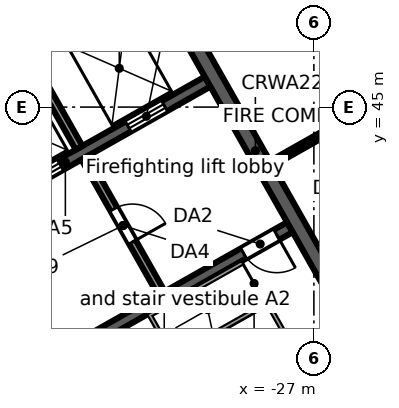
"""IFC4 building model, lengths in metres.
Left out: names, types, materials, properties, quantities, classifications, styles, units other than length and angle.
Written with IfcOpenShell. Run it as: python <this file> out.ifc"""

import sys

from ifc_helpers import new_model, si_unit, direction, frame, frame_2d, origin, place, context, subcontext, project, spatial, rectangle, extrude, element, fill, save


model = new_model("IFC4")
c1 = context("Model", 3, precision=1e-05, world=origin(), true_north=direction((0.0, 1.0)))
c2 = subcontext(c1, "Body", "Model", "MODEL_VIEW")
j1 = project(units=[si_unit("LENGTHUNIT", "METRE"), si_unit("PLANEANGLEUNIT", "RADIAN")], contexts=[c1])
p1 = place(None, origin())
s1 = spatial("IfcSite", under=j1, at=p1, CompositionType="ELEMENT")
p2 = place(p1, origin())
s2 = spatial("IfcBuilding", under=s1, at=p2, CompositionType="ELEMENT")
p3 = place(p2, frame((0.0, 0.0, 266.5)))
s3 = spatial("IfcBuildingStorey", under=s2, at=p3, CompositionType="ELEMENT", Elevation=266.5)
p4 = place(p3, frame((-58.732, 38.771, 0.0), z_axis=(0.0, 0.0, 1.0), x_axis=(0.870355615581, 0.492423702137, 0.0)))
e1 = element("IfcWall", 1, at=p4, inside=s3, PredefinedType="STANDARD", context=c2, shape_type="SweptSolid", body=[
    extrude(rectangle(XDim=64.052, YDim=0.25, at=frame_2d((32.026, 0.0))), origin(), (0.0, 0.0, 1.0), 3.52),
])
p5 = place(p4, frame((61.259, 0.0, 0.8)))
e2 = element("IfcOpeningElement", 2, at=p5, cuts=e1, PredefinedType="OPENING", context=c2, shape_type="SweptSolid", body=[
    extrude(rectangle(XDim=2.4, YDim=2.2, at=frame_2d((1.2, 1.1))), frame((0.0, 0.135, 0.0), z_axis=(0.0, -1.0, 0.0), x_axis=(1.0, 0.0, 0.0)), (0.0, 0.0, 1.0), 0.27),
])
p6 = place(p4, frame((58.216, 0.0, 0.8)))
e3 = element("IfcOpeningElement", 3, at=p6, cuts=e1, PredefinedType="OPENING", context=c2, shape_type="SweptSolid", body=[
    extrude(rectangle(XDim=2.4, YDim=2.2, at=frame_2d((1.2, 1.1))), frame((0.0, 0.135, 0.0), z_axis=(0.0, -1.0, 0.0), x_axis=(1.0, 0.0, 0.0)), (0.0, 0.0, 1.0), 0.27),
])
p7 = place(p4, frame((55.173, 0.0, 0.8)))
e4 = element("IfcOpeningElement", 4, at=p7, cuts=e1, PredefinedType="OPENING", context=c2, shape_type="SweptSolid", body=[
    extrude(rectangle(XDim=2.4, YDim=2.2, at=frame_2d((1.2, 1.1))), frame((0.0, 0.135, 0.0), z_axis=(0.0, -1.0, 0.0), x_axis=(1.0, 0.0, 0.0)), (0.0, 0.0, 1.0), 0.27),
])
p8 = place(p4, frame((52.129, 0.0, 0.8)))
e5 = element("IfcOpeningElement", 5, at=p8, cuts=e1, PredefinedType="OPENING", context=c2, shape_type="SweptSolid", body=[
    extrude(rectangle(XDim=2.4, YDim=2.2, at=frame_2d((1.2, 1.1))), frame((0.0, 0.135, 0.0), z_axis=(0.0, -1.0, 0.0), x_axis=(1.0, 0.0, 0.0)), (0.0, 0.0, 1.0), 0.27),
])
p9 = place(p4, frame((49.086, 0.0, 0.8)))
e6 = element("IfcOpeningElement", 6, at=p9, cuts=e1, PredefinedType="OPENING", context=c2, shape_type="SweptSolid", body=[
    extrude(rectangle(XDim=2.4, YDim=2.2, at=frame_2d((1.2, 1.1))), frame((0.0, 0.135, 0.0), z_axis=(0.0, -1.0, 0.0), x_axis=(1.0, 0.0, 0.0)), (0.0, 0.0, 1.0), 0.27),
])
p10 = place(p4, frame((46.043, 0.0, 0.8)))
e7 = element("IfcOpeningElement", 7, at=p10, cuts=e1, PredefinedType="OPENING", context=c2, shape_type="SweptSolid", body=[
    extrude(rectangle(XDim=2.4, YDim=2.2, at=frame_2d((1.2, 1.1))), frame((0.0, 0.135, 0.0), z_axis=(0.0, -1.0, 0.0), x_axis=(1.0, 0.0, 0.0)), (0.0, 0.0, 1.0), 0.27),
])
p11 = place(p4, frame((43.0, 0.0, 0.8)))
e8 = element("IfcOpeningElement", 8, at=p11, cuts=e1, PredefinedType="OPENING", context=c2, shape_type="SweptSolid", body=[
    extrude(rectangle(XDim=2.4, YDim=2.2, at=frame_2d((1.2, 1.1))), frame((0.0, 0.135, 0.0), z_axis=(0.0, -1.0, 0.0), x_axis=(1.0, 0.0, 0.0)), (0.0, 0.0, 1.0), 0.27),
])
p12 = place(p4, frame((39.956, 0.0, 0.8)))
e9 = element("IfcOpeningElement", 9, at=p12, cuts=e1, PredefinedType="OPENING", context=c2, shape_type="SweptSolid", body=[
    extrude(rectangle(XDim=2.4, YDim=2.2, at=frame_2d((1.2, 1.1))), frame((0.0, 0.135, 0.0), z_axis=(0.0, -1.0, 0.0), x_axis=(1.0, 0.0, 0.0)), (0.0, 0.0, 1.0), 0.27),
])
p13 = place(p4, frame((36.913, 0.0, 0.8)))
e10 = element("IfcOpeningElement", 10, at=p13, cuts=e1, PredefinedType="OPENING", context=c2, shape_type="SweptSolid", body=[
    extrude(rectangle(XDim=2.4, YDim=2.2, at=frame_2d((1.2, 1.1))), frame((0.0, 0.135, 0.0), z_axis=(0.0, -1.0, 0.0), x_axis=(1.0, 0.0, 0.0)), (0.0, 0.0, 1.0), 0.27),
])
p14 = place(p4, frame((33.87, 0.0, 0.8)))
e11 = element("IfcOpeningElement", 11, at=p14, cuts=e1, PredefinedType="OPENING", context=c2, shape_type="SweptSolid", body=[
    extrude(rectangle(XDim=2.4, YDim=2.2, at=frame_2d((1.2, 1.1))), frame((0.0, 0.135, 0.0), z_axis=(0.0, -1.0, 0.0), x_axis=(1.0, 0.0, 0.0)), (0.0, 0.0, 1.0), 0.27),
])
p15 = place(p4, frame((30.826, 0.0, 0.8)))
e12 = element("IfcOpeningElement", 12, at=p15, cuts=e1, PredefinedType="OPENING", context=c2, shape_type="SweptSolid", body=[
    extrude(rectangle(XDim=2.4, YDim=2.2, at=frame_2d((1.2, 1.1))), frame((0.0, 0.135, 0.0), z_axis=(0.0, -1.0, 0.0), x_axis=(1.0, 0.0, 0.0)), (0.0, 0.0, 1.0), 0.27),
])
p16 = place(p4, frame((27.783, 0.0, 0.8)))
e13 = element("IfcOpeningElement", 13, at=p16, cuts=e1, PredefinedType="OPENING", context=c2, shape_type="SweptSolid", body=[
    extrude(rectangle(XDim=2.4, YDim=2.2, at=frame_2d((1.2, 1.1))), frame((0.0, 0.135, 0.0), z_axis=(0.0, -1.0, 0.0), x_axis=(1.0, 0.0, 0.0)), (0.0, 0.0, 1.0), 0.27),
])
p17 = place(p4, frame((24.74, 0.0, 0.8)))
e14 = element("IfcOpeningElement", 14, at=p17, cuts=e1, PredefinedType="OPENING", context=c2, shape_type="SweptSolid", body=[
    extrude(rectangle(XDim=2.4, YDim=2.2, at=frame_2d((1.2, 1.1))), frame((0.0, 0.135, 0.0), z_axis=(0.0, -1.0, 0.0), x_axis=(1.0, 0.0, 0.0)), (0.0, 0.0, 1.0), 0.27),
])
p18 = place(p4, frame((21.696, 0.0, 0.8)))
e15 = element("IfcOpeningElement", 15, at=p18, cuts=e1, PredefinedType="OPENING", context=c2, shape_type="SweptSolid", body=[
    extrude(rectangle(XDim=2.4, YDim=2.2, at=frame_2d((1.2, 1.1))), frame((0.0, 0.135, 0.0), z_axis=(0.0, -1.0, 0.0), x_axis=(1.0, 0.0, 0.0)), (0.0, 0.0, 1.0), 0.27),
])
p19 = place(p4, frame((18.653, 0.0, 0.8)))
e16 = element("IfcOpeningElement", 16, at=p19, cuts=e1, PredefinedType="OPENING", context=c2, shape_type="SweptSolid", body=[
    extrude(rectangle(XDim=2.4, YDim=2.2, at=frame_2d((1.2, 1.1))), frame((0.0, 0.135, 0.0), z_axis=(0.0, -1.0, 0.0), x_axis=(1.0, 0.0, 0.0)), (0.0, 0.0, 1.0), 0.27),
])
p20 = place(p4, frame((15.61, 0.0, 0.8)))
e17 = element("IfcOpeningElement", 17, at=p20, cuts=e1, PredefinedType="OPENING", context=c2, shape_type="SweptSolid", body=[
    extrude(rectangle(XDim=2.4, YDim=2.2, at=frame_2d((1.2, 1.1))), frame((0.0, 0.135, 0.0), z_axis=(0.0, -1.0, 0.0), x_axis=(1.0, 0.0, 0.0)), (0.0, 0.0, 1.0), 0.27),
])
p21 = place(p4, frame((12.567, 0.0, 0.8)))
e18 = element("IfcOpeningElement", 18, at=p21, cuts=e1, PredefinedType="OPENING", context=c2, shape_type="SweptSolid", body=[
    extrude(rectangle(XDim=2.4, YDim=2.2, at=frame_2d((1.2, 1.1))), frame((0.0, 0.135, 0.0), z_axis=(0.0, -1.0, 0.0), x_axis=(1.0, 0.0, 0.0)), (0.0, 0.0, 1.0), 0.27),
])
p22 = place(p4, frame((9.523, 0.0, 0.8)))
e19 = element("IfcOpeningElement", 19, at=p22, cuts=e1, PredefinedType="OPENING", context=c2, shape_type="SweptSolid", body=[
    extrude(rectangle(XDim=2.4, YDim=2.2, at=frame_2d((1.2, 1.1))), frame((0.0, 0.135, 0.0), z_axis=(0.0, -1.0, 0.0), x_axis=(1.0, 0.0, 0.0)), (0.0, 0.0, 1.0), 0.27),
])
p23 = place(p4, frame((6.48, 0.0, 0.8)))
e20 = element("IfcOpeningElement", 20, at=p23, cuts=e1, PredefinedType="OPENING", context=c2, shape_type="SweptSolid", body=[
    extrude(rectangle(XDim=2.4, YDim=2.2, at=frame_2d((1.2, 1.1))), frame((0.0, 0.135, 0.0), z_axis=(0.0, -1.0, 0.0), x_axis=(1.0, 0.0, 0.0)), (0.0, 0.0, 1.0), 0.27),
])
p24 = place(p4, frame((3.437, 0.0, 0.8)))
e21 = element("IfcOpeningElement", 21, at=p24, cuts=e1, PredefinedType="OPENING", context=c2, shape_type="SweptSolid", body=[
    extrude(rectangle(XDim=2.4, YDim=2.2, at=frame_2d((1.2, 1.1))), frame((0.0, 0.135, 0.0), z_axis=(0.0, -1.0, 0.0), x_axis=(1.0, 0.0, 0.0)), (0.0, 0.0, 1.0), 0.27),
])
p25 = place(p4, frame((0.393, 0.0, 0.8)))
e22 = element("IfcOpeningElement", 22, at=p25, cuts=e1, PredefinedType="OPENING", context=c2, shape_type="SweptSolid", body=[
    extrude(rectangle(XDim=2.4, YDim=2.2, at=frame_2d((1.2, 1.1))), frame((0.0, 0.135, 0.0), z_axis=(0.0, -1.0, 0.0), x_axis=(1.0, 0.0, 0.0)), (0.0, 0.0, 1.0), 0.27),
])
p26 = place(p3, frame((-3.017, 46.293, 0.0), z_axis=(0.0, 0.0, 1.0), x_axis=(-0.870355474887, -0.492423950812, 0.0)))
e23 = element("IfcWall", 23, at=p26, inside=s3, PredefinedType="STANDARD", context=c2, shape_type="SweptSolid", body=[
    extrude(rectangle(XDim=40.34, YDim=0.25, at=frame_2d((20.17, 0.0))), origin(), (0.0, 0.0, 1.0), 3.52),
])
p27 = place(p26, frame((37.428, 0.0, 0.8)))
e24 = element("IfcOpeningElement", 24, at=p27, cuts=e23, PredefinedType="OPENING", context=c2, shape_type="SweptSolid", body=[
    extrude(rectangle(XDim=2.4, YDim=2.2, at=frame_2d((1.2, 1.1))), frame((0.0, 0.135, 0.0), z_axis=(0.0, -1.0, 0.0), x_axis=(1.0, 0.0, 0.0)), (0.0, 0.0, 1.0), 0.27),
])
p28 = place(p26, frame((34.372, 0.0, 0.0)))
e25 = element("IfcOpeningElement", 25, at=p28, cuts=e23, PredefinedType="OPENING", context=c2, shape_type="SweptSolid", body=[
    extrude(rectangle(XDim=1.8, YDim=2.4, at=frame_2d((0.9, 1.2))), frame((0.0, 0.135, 0.0), z_axis=(0.0, -1.0, 0.0), x_axis=(1.0, 0.0, 0.0)), (0.0, 0.0, 1.0), 0.27),
])
p29 = place(p26, frame((30.716, 0.0, 0.8)))
e26 = element("IfcOpeningElement", 26, at=p29, cuts=e23, PredefinedType="OPENING", context=c2, shape_type="SweptSolid", body=[
    extrude(rectangle(XDim=2.4, YDim=2.2, at=frame_2d((1.2, 1.1))), frame((0.0, 0.135, 0.0), z_axis=(0.0, -1.0, 0.0), x_axis=(1.0, 0.0, 0.0)), (0.0, 0.0, 1.0), 0.27),
])
p30 = place(p26, frame((27.36, 0.0, 0.8)))
e27 = element("IfcOpeningElement", 27, at=p30, cuts=e23, PredefinedType="OPENING", context=c2, shape_type="SweptSolid", body=[
    extrude(rectangle(XDim=2.4, YDim=2.2, at=frame_2d((1.2, 1.1))), frame((0.0, 0.135, 0.0), z_axis=(0.0, -1.0, 0.0), x_axis=(1.0, 0.0, 0.0)), (0.0, 0.0, 1.0), 0.27),
])
p31 = place(p26, frame((24.304, 0.0, 0.0)))
e28 = element("IfcOpeningElement", 28, at=p31, cuts=e23, PredefinedType="OPENING", context=c2, shape_type="SweptSolid", body=[
    extrude(rectangle(XDim=1.8, YDim=2.4, at=frame_2d((0.9, 1.2))), frame((0.0, 0.135, 0.0), z_axis=(0.0, -1.0, 0.0), x_axis=(1.0, 0.0, 0.0)), (0.0, 0.0, 1.0), 0.27),
])
p32 = place(p26, frame((20.648, 0.0, 0.8)))
e29 = element("IfcOpeningElement", 29, at=p32, cuts=e23, PredefinedType="OPENING", context=c2, shape_type="SweptSolid", body=[
    extrude(rectangle(XDim=2.4, YDim=2.2, at=frame_2d((1.2, 1.1))), frame((0.0, 0.135, 0.0), z_axis=(0.0, -1.0, 0.0), x_axis=(1.0, 0.0, 0.0)), (0.0, 0.0, 1.0), 0.27),
])
p33 = place(p26, frame((17.292, 0.0, 0.8)))
e30 = element("IfcOpeningElement", 30, at=p33, cuts=e23, PredefinedType="OPENING", context=c2, shape_type="SweptSolid", body=[
    extrude(rectangle(XDim=2.4, YDim=2.2, at=frame_2d((1.2, 1.1))), frame((0.0, 0.135, 0.0), z_axis=(0.0, -1.0, 0.0), x_axis=(1.0, 0.0, 0.0)), (0.0, 0.0, 1.0), 0.27),
])
p34 = place(p26, frame((14.236, 0.0, 0.0)))
e31 = element("IfcOpeningElement", 31, at=p34, cuts=e23, PredefinedType="OPENING", context=c2, shape_type="SweptSolid", body=[
    extrude(rectangle(XDim=1.8, YDim=2.4, at=frame_2d((0.9, 1.2))), frame((0.0, 0.135, 0.0), z_axis=(0.0, -1.0, 0.0), x_axis=(1.0, 0.0, 0.0)), (0.0, 0.0, 1.0), 0.27),
])
p35 = place(p26, frame((10.58, 0.0, 0.8)))
e32 = element("IfcOpeningElement", 32, at=p35, cuts=e23, PredefinedType="OPENING", context=c2, shape_type="SweptSolid", body=[
    extrude(rectangle(XDim=2.4, YDim=2.2, at=frame_2d((1.2, 1.1))), frame((0.0, 0.135, 0.0), z_axis=(0.0, -1.0, 0.0), x_axis=(1.0, 0.0, 0.0)), (0.0, 0.0, 1.0), 0.27),
])
p36 = place(p26, frame((7.224, 0.0, 0.8)))
e33 = element("IfcOpeningElement", 33, at=p36, cuts=e23, PredefinedType="OPENING", context=c2, shape_type="SweptSolid", body=[
    extrude(rectangle(XDim=2.4, YDim=2.2, at=frame_2d((1.2, 1.1))), frame((0.0, 0.135, 0.0), z_axis=(0.0, -1.0, 0.0), x_axis=(1.0, 0.0, 0.0)), (0.0, 0.0, 1.0), 0.27),
])
p37 = place(p26, frame((4.168, 0.0, 0.0)))
e34 = element("IfcOpeningElement", 34, at=p37, cuts=e23, PredefinedType="OPENING", context=c2, shape_type="SweptSolid", body=[
    extrude(rectangle(XDim=1.8, YDim=2.4, at=frame_2d((0.9, 1.2))), frame((0.0, 0.135, 0.0), z_axis=(0.0, -1.0, 0.0), x_axis=(1.0, 0.0, 0.0)), (0.0, 0.0, 1.0), 0.27),
])
p38 = place(p26, frame((0.512, 0.0, 0.8)))
e35 = element("IfcOpeningElement", 35, at=p38, cuts=e23, PredefinedType="OPENING", context=c2, shape_type="SweptSolid", body=[
    extrude(rectangle(XDim=2.4, YDim=2.2, at=frame_2d((1.2, 1.1))), frame((0.0, 0.135, 0.0), z_axis=(0.0, -1.0, 0.0), x_axis=(1.0, 0.0, 0.0)), (0.0, 0.0, 1.0), 0.27),
])
p39 = place(p3, frame((-34.245, 38.097, 0.0), z_axis=(0.0, 0.0, 1.0), x_axis=(0.870356351998, 0.492422400523, 0.0)))
e36 = element("IfcWall", 36, at=p39, inside=s3, PredefinedType="SOLIDWALL", context=c2, shape_type="SweptSolid", body=[
    extrude(rectangle(XDim=7.6, YDim=0.3, at=frame_2d((3.8, 0.0))), origin(), (0.0, 0.0, 1.0), 3.52),
])
p40 = place(p39, frame((6.2, 0.0, 0.0)))
e37 = element("IfcOpeningElement", 37, at=p40, cuts=e36, PredefinedType="OPENING", context=c2, shape_type="SweptSolid", body=[
    extrude(rectangle(XDim=1.0, YDim=2.1, at=frame_2d((0.5, 1.05))), frame((0.0, 0.16, 0.0), z_axis=(0.0, -1.0, 0.0), x_axis=(1.0, 0.0, 0.0)), (0.0, 0.0, 1.0), 0.32),
])
p41 = place(p3, frame((-37.282, 41.435, 0.0), z_axis=(0.0, 0.0, 1.0), x_axis=(0.870361315115, 0.492413628113, 0.0)))
e38 = element("IfcWall", 38, at=p41, inside=s3, PredefinedType="SOLIDWALL", context=c2, shape_type="SweptSolid", body=[
    extrude(rectangle(XDim=8.6, YDim=0.3, at=frame_2d((4.3, 0.0))), origin(), (0.0, 0.0, 1.0), 3.52),
])
p42 = place(p41, frame((0.65, 0.0, 0.0)))
e39 = element("IfcOpeningElement", 39, at=p42, cuts=e38, PredefinedType="OPENING", context=c2, shape_type="SweptSolid", body=[
    extrude(rectangle(XDim=1.1, YDim=2.1, at=frame_2d((0.55, 1.05))), frame((0.0, 0.16, 0.0), z_axis=(0.0, -1.0, 0.0), x_axis=(1.0, 0.0, 0.0)), (0.0, 0.0, 1.0), 0.32),
])
p43 = place(p41, frame((3.05, 0.0, 0.0)))
e40 = element("IfcOpeningElement", 40, at=p43, cuts=e38, PredefinedType="OPENING", context=c2, shape_type="SweptSolid", body=[
    extrude(rectangle(XDim=1.1, YDim=2.1, at=frame_2d((0.55, 1.05))), frame((0.0, 0.16, 0.0), z_axis=(0.0, -1.0, 0.0), x_axis=(1.0, 0.0, 0.0)), (0.0, 0.0, 1.0), 0.32),
])
p44 = place(p41, frame((6.2, 0.0, 0.0)))
e41 = element("IfcOpeningElement", 41, at=p44, cuts=e38, PredefinedType="OPENING", context=c2, shape_type="SweptSolid", body=[
    extrude(rectangle(XDim=1.1, YDim=2.1, at=frame_2d((0.55, 1.05))), frame((0.0, 0.16, 0.0), z_axis=(0.0, -1.0, 0.0), x_axis=(1.0, 0.0, 0.0)), (0.0, 0.0, 1.0), 0.32),
])
p45 = place(p3, frame((-46.51, 41.499, 0.0), z_axis=(0.0, 0.0, 1.0), x_axis=(0.870356271124, 0.492422543467, 0.0)))
e42 = element("IfcWall", 42, at=p45, inside=s3, PredefinedType="SOLIDWALL", context=c2, shape_type="SweptSolid", body=[
    extrude(rectangle(XDim=17.0, YDim=0.4, at=frame_2d((8.5, 0.0))), origin(), (0.0, 0.0, 1.0), 3.52),
])
p46 = place(p3, frame((-33.031, 43.667, 0.0), z_axis=(0.0, 0.0, 1.0), x_axis=(0.492408451753, -0.87036424366, 0.0)))
e43 = element("IfcWall", 43, at=p46, inside=s3, PredefinedType="PARTITIONING", context=c2, shape_type="SweptSolid", body=[
    extrude(rectangle(XDim=4.1, YDim=0.2, at=frame_2d((2.05, 0.0))), origin(), (0.0, 0.0, 1.0), 3.52),
])
p47 = place(p46, frame((1.55, 0.0, 0.0)))
e44 = element("IfcOpeningElement", 44, at=p47, cuts=e43, PredefinedType="OPENING", context=c2, shape_type="SweptSolid", body=[
    extrude(rectangle(XDim=1.0, YDim=2.1, at=frame_2d((0.5, 1.05))), frame((0.0, 0.11, 0.0), z_axis=(0.0, -1.0, 0.0), x_axis=(1.0, 0.0, 0.0)), (0.0, 0.0, 1.0), 0.22),
])
p48 = place(p3, frame((-35.271, 47.628, 0.0), z_axis=(0.0, 0.0, 1.0), x_axis=(0.492422543467, -0.870356271124, 0.0)))
e45 = element("IfcWall", 45, at=p48, inside=s3, PredefinedType="SOLIDWALL", context=c2, shape_type="SweptSolid", body=[
    extrude(rectangle(XDim=4.25, YDim=0.2, at=frame_2d((2.125, 0.0))), origin(), (0.0, 0.0, 1.0), 3.52),
])
p49 = place(p3, frame((-31.79, 49.597, 0.0), z_axis=(0.0, 0.0, 1.0), x_axis=(0.492421663121, -0.870356769198, 0.0)))
e46 = element("IfcWall", 46, at=p49, inside=s3, PredefinedType="SOLIDWALL", context=c2, shape_type="SweptSolid", body=[
    extrude(rectangle(XDim=13.2, YDim=0.4, at=frame_2d((6.6, 0.0))), origin(), (0.0, 0.0, 1.0), 3.52),
])
p50 = place(p3, frame((-28.119, 43.516, 0.0), z_axis=(0.0, 0.0, 1.0), x_axis=(0.870310250913, 0.49250387527, 0.0)))
e47 = element("IfcWall", 47, at=p50, inside=s3, PredefinedType="PARTITIONING", context=c2, shape_type="SweptSolid", body=[
    extrude(rectangle(XDim=6.25, YDim=0.15, at=frame_2d((3.125, 0.0))), origin(), (0.0, 0.0, 1.0), 2.792),
])
p51 = place(p43, origin())
e48 = element("IfcDoor", 48, at=p51, inside=s3, OperationType="DOUBLE_DOOR_SLIDING", PredefinedType="DOOR", context=c2, shape_type="SweptSolid", body=[
    extrude(rectangle(XDim=1.1, YDim=2.1, at=frame_2d((0.55, 1.05))), frame((0.0, 0.025, 0.0), z_axis=(0.0, -1.0, 0.0), x_axis=(1.0, 0.0, 0.0)), (0.0, 0.0, 1.0), 0.05),
])
fill(e40, e48)
p52 = place(p44, origin())
e49 = element("IfcDoor", 49, at=p52, inside=s3, OperationType="DOUBLE_DOOR_SLIDING", PredefinedType="DOOR", context=c2, shape_type="SweptSolid", body=[
    extrude(rectangle(XDim=1.1, YDim=2.1, at=frame_2d((0.55, 1.05))), frame((0.0, 0.025, 0.0), z_axis=(0.0, -1.0, 0.0), x_axis=(1.0, 0.0, 0.0)), (0.0, 0.0, 1.0), 0.05),
])
fill(e41, e49)
p53 = place(p40, frame((1.0, 0.0, 0.0), z_axis=(0.0, 0.0, 1.0), x_axis=(-1.0, 0.0, 0.0)))
e50 = element("IfcDoor", 50, at=p53, inside=s3, OperationType="SINGLE_SWING_LEFT", PredefinedType="DOOR", context=c2, shape_type="SweptSolid", body=[
    extrude(rectangle(XDim=1.0, YDim=2.1, at=frame_2d((0.5, 1.05))), frame((0.0, 0.025, 0.0), z_axis=(0.0, -1.0, 0.0), x_axis=(1.0, 0.0, 0.0)), (0.0, 0.0, 1.0), 0.05),
])
fill(e37, e50)
p54 = place(p47, origin())
e51 = element("IfcDoor", 51, at=p54, inside=s3, OperationType="SINGLE_SWING_RIGHT", PredefinedType="DOOR", context=c2, shape_type="SweptSolid", body=[
    extrude(rectangle(XDim=1.0, YDim=2.1, at=frame_2d((0.5, 1.05))), frame((0.0, 0.025, 0.0), z_axis=(0.0, -1.0, 0.0), x_axis=(1.0, 0.0, 0.0)), (0.0, 0.0, 1.0), 0.05),
])
fill(e44, e51)
save(model, sys.argv[1])
